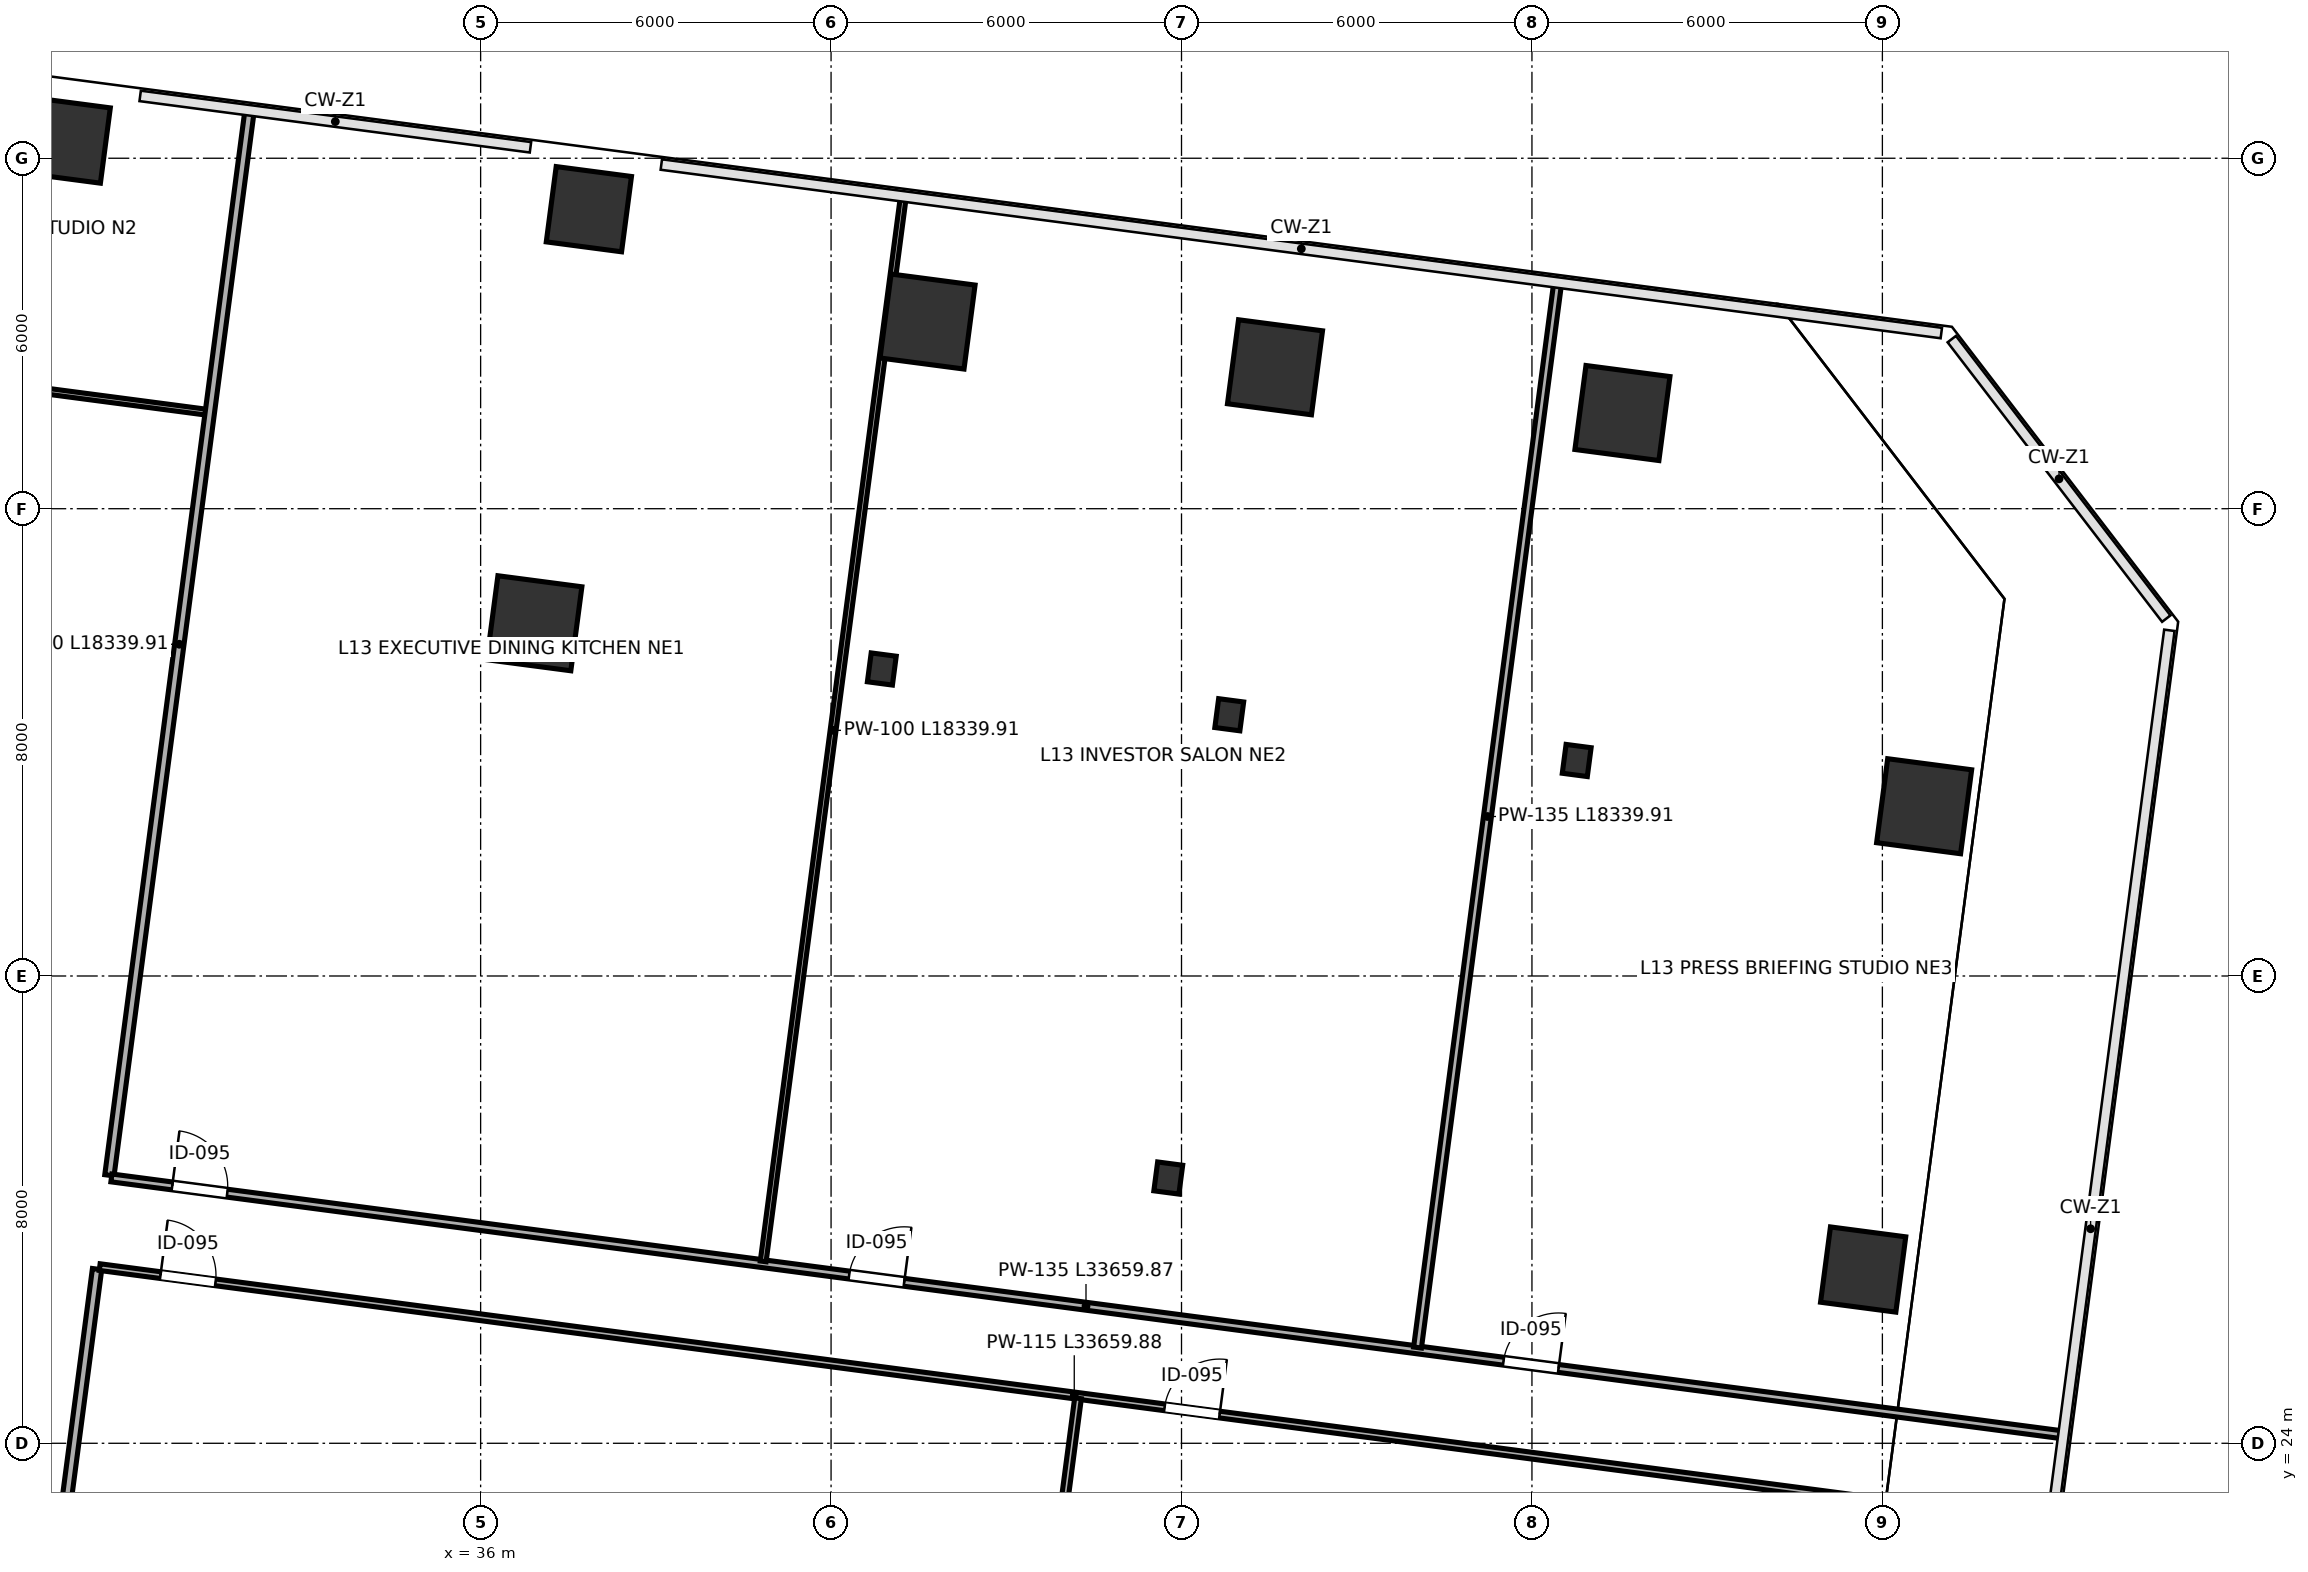
"""IFC4 building model, lengths in metres.
Left out: names, types, materials, properties, quantities, classifications, styles, units other than length and angle.
Written with IfcOpenShell. Run it as: python <this file> out.ifc"""

import sys

from ifc_helpers import new_model, si_unit, direction, frame, frame_2d, origin, origin_2d, place, context, subcontext, project, spatial, rectangle, i_section, extrude, source, transform, mapped, element, fill, save


model = new_model("IFC4")
c1 = context("Model", 3, precision=1e-05, world=origin(), true_north=direction((0.0, 1.0)))
c2 = subcontext(c1, "Body", "Model", "MODEL_VIEW")
j1 = project(units=[si_unit("LENGTHUNIT", "METRE"), si_unit("PLANEANGLEUNIT", "RADIAN")], contexts=[c1])
p1 = place(None, origin())
s1 = spatial("IfcSite", under=j1, at=p1, CompositionType="ELEMENT")
p2 = place(p1, origin())
s2 = spatial("IfcBuilding", under=s1, at=p2, CompositionType="ELEMENT")
p3 = place(p2, frame((0.0, 0.0, 61.6)))
s3 = spatial("IfcBuildingStorey", under=s2, at=p3, CompositionType="ELEMENT", Elevation=61.6)
m1 = source(origin(), c2, "Body", "SweptSolid", [
    extrude(rectangle(XDim=1.3, YDim=1.3, at=origin_2d()), origin(), (0.0, 0.0, 1.0), 4.798),
])
p4 = place(p3, frame((28.93, 46.302, 0.001), z_axis=(0.0, 0.0, 1.0), x_axis=(-0.991444861374, 0.13052619222, 0.0)))
e1 = element("IfcColumn", 1, at=p4, inside=s3, PredefinedType="COLUMN", context=c2, shape_type="MappedRepresentation", body=[
    mapped(m1, transform((0.0, 0.0, 0.0), scale=1.0)),
])
m2 = source(origin(), c2, "Body", "SweptSolid", [
    extrude(rectangle(XDim=1.45, YDim=1.45, at=origin_2d()), origin(), (0.0, 0.0, 1.0), 4.798),
])
p5 = place(p3, frame((36.92, 38.039, 0.001), z_axis=(0.0, 0.0, 1.0), x_axis=(-0.991444861374, 0.13052619222, 0.0)))
e2 = element("IfcColumn", 2, at=p5, inside=s3, PredefinedType="COLUMN", context=c2, shape_type="MappedRepresentation", body=[
    mapped(m2, transform((0.0, 0.0, 0.0), scale=1.0)),
])
p6 = place(p3, frame((37.854, 45.128, 0.001), z_axis=(0.0, 0.0, 1.0), x_axis=(-0.991444861374, 0.13052619222, 0.0)))
e3 = element("IfcColumn", 3, at=p6, inside=s3, PredefinedType="COLUMN", context=c2, shape_type="MappedRepresentation", body=[
    mapped(m1, transform((0.0, 0.0, 0.0), scale=1.0)),
])
m3 = source(origin(), c2, "Body", "SweptSolid", [
    extrude(i_section(OverallWidth=0.432, OverallDepth=0.498, WebThickness=0.056, FlangeThickness=0.089, FilletRadius=0.015, at=origin_2d()), origin(), (0.0, 0.0, 1.0), 4.798),
])
p7 = place(p3, frame((42.869, 37.256, 0.001), z_axis=(0.0, 0.0, 1.0), x_axis=(-0.991444861374, 0.13052619222, 0.0)))
e4 = element("IfcColumn", 4, at=p7, inside=s3, PredefinedType="COLUMN", context=c2, shape_type="MappedRepresentation", body=[
    mapped(m3, transform((0.0, 0.0, 0.0), scale=1.0)),
])
p8 = place(p3, frame((43.652, 43.204, 0.001), z_axis=(0.0, 0.0, 1.0), x_axis=(-0.991444861374, 0.13052619222, 0.0)))
e5 = element("IfcColumn", 5, at=p8, inside=s3, PredefinedType="COLUMN", context=c2, shape_type="MappedRepresentation", body=[
    mapped(m2, transform((0.0, 0.0, 0.0), scale=1.0)),
])
for number, where, z_axis, x_axis in (
    (6, (47.773, 28.541, 0.001), (0.0, 0.0, 1.0), (-0.991, 0.131, 0.0)),
    (7, (48.817, 36.473, 0.001), (0.0, 0.0, 1.0), (-0.991, 0.131, 0.0)),
):
    element("IfcColumn", number, at=place(p3, frame(where, z_axis=z_axis, x_axis=x_axis)), inside=s3, PredefinedType="COLUMN", context=c2, shape_type="MappedRepresentation", body=[
        mapped(m3, transform((0.0, 0.0, 0.0), scale=1.0)),
    ])
p9 = place(p3, frame((49.601, 42.421, 0.001), z_axis=(0.0, 0.0, 1.0), x_axis=(-0.991444861374, 0.13052619222, 0.0)))
e8 = element("IfcColumn", 8, at=p9, inside=s3, PredefinedType="COLUMN", context=c2, shape_type="MappedRepresentation", body=[
    mapped(m2, transform((0.0, 0.0, 0.0), scale=1.0)),
])
p10 = place(p3, frame((54.766, 35.689, 0.001), z_axis=(0.0, 0.0, 1.0), x_axis=(-0.991444861374, 0.13052619222, 0.0)))
e9 = element("IfcColumn", 9, at=p10, inside=s3, PredefinedType="COLUMN", context=c2, shape_type="MappedRepresentation", body=[
    mapped(m3, transform((0.0, 0.0, 0.0), scale=1.0)),
])
p11 = place(p3, frame((55.549, 41.638, 0.001), z_axis=(0.0, 0.0, 1.0), x_axis=(-0.991444861374, 0.13052619222, 0.0)))
e10 = element("IfcColumn", 10, at=p11, inside=s3, PredefinedType="COLUMN", context=c2, shape_type="MappedRepresentation", body=[
    mapped(m2, transform((0.0, 0.0, 0.0), scale=1.0)),
])
p12 = place(p3, frame((59.671, 26.975, 0.001), z_axis=(0.0, 0.0, 1.0), x_axis=(-0.991444861374, 0.13052619222, 0.0)))
e11 = element("IfcColumn", 11, at=p12, inside=s3, PredefinedType="COLUMN", context=c2, shape_type="MappedRepresentation", body=[
    mapped(m1, transform((0.0, 0.0, 0.0), scale=1.0)),
])
m4 = source(origin(), c2, "Body", "SweptSolid", [
    extrude(rectangle(XDim=1.45, YDim=1.45, at=origin_2d()), origin(), (0.0, 0.0, 1.0), 4.798),
])
p13 = place(p3, frame((60.715, 34.906, 0.001), z_axis=(0.0, 0.0, 1.0), x_axis=(-0.991444861374, 0.13052619222, 0.0)))
e12 = element("IfcColumn", 12, at=p13, inside=s3, PredefinedType="COLUMN", context=c2, shape_type="MappedRepresentation", body=[
    mapped(m4, transform((0.0, 0.0, 0.0), scale=1.0)),
])
p14 = place(p3, frame((5.546, 45.044, 0.0), z_axis=(0.0, 0.0, 1.0), x_axis=(0.99144534416, -0.13052252504, 0.0)))
e13 = element("IfcWall", 13, at=p14, inside=s3, PredefinedType="PARTITIONING", context=c2, shape_type="SweptSolid", body=[
    extrude(rectangle(XDim=26.0, YDim=0.1, at=frame_2d((13.0, 0.0))), origin(), (0.0, 0.0, 1.0), 4.56),
])
p15 = place(p14, frame((0.91, 0.0, 0.0)))
e14 = element("IfcOpeningElement", 14, at=p15, cuts=e13, PredefinedType="OPENING", context=c2, shape_type="SweptSolid", body=[
    extrude(rectangle(XDim=0.95, YDim=2.15, at=frame_2d((0.475, 1.075))), frame((0.0, 0.06, 0.0), z_axis=(0.0, -1.0, 0.0), x_axis=(1.0, 0.0, 0.0)), (0.0, 0.0, 1.0), 0.12),
])
p16 = place(p14, frame((19.11, 0.0, 0.0)))
e15 = element("IfcOpeningElement", 15, at=p16, cuts=e13, PredefinedType="OPENING", context=c2, shape_type="SweptSolid", body=[
    extrude(rectangle(XDim=0.95, YDim=2.15, at=frame_2d((0.475, 1.075))), frame((0.0, 0.06, 0.0), z_axis=(0.0, -1.0, 0.0), x_axis=(1.0, 0.0, 0.0)), (0.0, 0.0, 1.0), 0.12),
])
p17 = place(p3, frame((29.644, 28.588, 0.0), z_axis=(0.0, 0.0, 1.0), x_axis=(0.130525105318, 0.991445004467, 0.0)))
e16 = element("IfcWall", 16, at=p17, inside=s3, PredefinedType="PARTITIONING", context=c2, shape_type="SweptSolid", body=[
    extrude(rectangle(XDim=18.34, YDim=0.16, at=frame_2d((9.17, 0.0))), origin(), (0.0, 0.0, 1.0), 3.695),
])
p18 = place(p3, frame((27.595, 13.022, 0.0), z_axis=(0.0, 0.0, 1.0), x_axis=(0.130532558102, 0.991444023269, 0.0)))
e17 = element("IfcWall", 17, at=p18, inside=s3, PredefinedType="PARTITIONING", context=c2, shape_type="SweptSolid", body=[
    extrude(rectangle(XDim=14.08, YDim=0.16, at=frame_2d((7.04, 0.0))), origin(), (0.0, 0.0, 1.0), 4.56),
])
p19 = place(p3, frame((29.679, 28.543, 0.0), z_axis=(0.0, 0.0, 1.0), x_axis=(0.991444714197, -0.130527310133, 0.0)))
e18 = element("IfcWall", 18, at=p19, inside=s3, PredefinedType="PARTITIONING", context=c2, shape_type="SweptSolid", body=[
    extrude(rectangle(XDim=33.66, YDim=0.135, at=frame_2d((16.83, 0.0))), origin(), (0.0, 0.0, 1.0), 3.695),
])
p20 = place(p19, frame((1.05, 0.0, 0.0)))
e19 = element("IfcOpeningElement", 19, at=p20, cuts=e18, PredefinedType="OPENING", context=c2, shape_type="SweptSolid", body=[
    extrude(rectangle(XDim=0.95, YDim=2.15, at=frame_2d((0.475, 1.075))), frame((0.0, 0.078, 0.0), z_axis=(0.0, -1.0, 0.0), x_axis=(1.0, 0.0, 0.0)), (0.0, 0.0, 1.0), 0.155),
])
p21 = place(p19, frame((12.74, 0.0, 0.0)))
e20 = element("IfcOpeningElement", 20, at=p21, cuts=e18, PredefinedType="OPENING", context=c2, shape_type="SweptSolid", body=[
    extrude(rectangle(XDim=0.95, YDim=2.15, at=frame_2d((0.475, 1.075))), frame((0.0, 0.078, 0.0), z_axis=(0.0, -1.0, 0.0), x_axis=(1.0, 0.0, 0.0)), (0.0, 0.0, 1.0), 0.155),
])
p22 = place(p19, frame((24.04, 0.0, 0.0)))
e21 = element("IfcOpeningElement", 21, at=p22, cuts=e18, PredefinedType="OPENING", context=c2, shape_type="SweptSolid", body=[
    extrude(rectangle(XDim=0.95, YDim=2.15, at=frame_2d((0.475, 1.075))), frame((0.0, 0.078, 0.0), z_axis=(0.0, -1.0, 0.0), x_axis=(1.0, 0.0, 0.0)), (0.0, 0.0, 1.0), 0.155),
])
p23 = place(p3, frame((29.478, 27.016, 0.0), z_axis=(0.0, 0.0, 1.0), x_axis=(0.991444590622, -0.130528248771, 0.0)))
e22 = element("IfcWall", 22, at=p23, inside=s3, PredefinedType="PARTITIONING", context=c2, shape_type="SweptSolid", body=[
    extrude(rectangle(XDim=33.66, YDim=0.115, at=frame_2d((16.83, 0.0))), origin(), (0.0, 0.0, 1.0), 3.695),
])
p24 = place(p23, frame((1.05, 0.0, 0.0)))
e23 = element("IfcOpeningElement", 23, at=p24, cuts=e22, PredefinedType="OPENING", context=c2, shape_type="SweptSolid", body=[
    extrude(rectangle(XDim=0.95, YDim=2.15, at=frame_2d((0.475, 1.075))), frame((0.0, 0.067, 0.0), z_axis=(0.0, -1.0, 0.0), x_axis=(1.0, 0.0, 0.0)), (0.0, 0.0, 1.0), 0.135),
])
p25 = place(p23, frame((18.39, 0.0, 0.0)))
e24 = element("IfcOpeningElement", 24, at=p25, cuts=e22, PredefinedType="OPENING", context=c2, shape_type="SweptSolid", body=[
    extrude(rectangle(XDim=0.95, YDim=2.15, at=frame_2d((0.475, 1.075))), frame((0.0, 0.067, 0.0), z_axis=(0.0, -1.0, 0.0), x_axis=(1.0, 0.0, 0.0)), (0.0, 0.0, 1.0), 0.135),
])
p26 = place(p3, frame((40.838, 27.114, 0.0), z_axis=(0.0, 0.0, 1.0), x_axis=(0.130538190585, 0.991443281685, 0.0)))
e25 = element("IfcWall", 25, at=p26, inside=s3, PredefinedType="PARTITIONING", context=c2, shape_type="SweptSolid", body=[
    extrude(rectangle(XDim=18.34, YDim=0.1, at=frame_2d((9.17, 0.0))), origin(), (0.0, 0.0, 1.0), 4.56),
])
p27 = place(p3, frame((52.041, 25.639, 0.0), z_axis=(0.0, 0.0, 1.0), x_axis=(0.130523382643, 0.991445231258, 0.0)))
e26 = element("IfcWall", 26, at=p27, inside=s3, PredefinedType="PARTITIONING", context=c2, shape_type="SweptSolid", body=[
    extrude(rectangle(XDim=18.34, YDim=0.135, at=frame_2d((9.17, 0.0))), origin(), (0.0, 0.0, 1.0), 3.923),
])
p28 = place(p3, frame((44.964, 15.173, 0.0), z_axis=(0.0, 0.0, 1.0), x_axis=(0.130519754353, 0.991445708914, 0.0)))
e27 = element("IfcWall", 27, at=p28, inside=s3, PredefinedType="PARTITIONING", context=c2, shape_type="SweptSolid", body=[
    extrude(rectangle(XDim=9.68, YDim=0.115, at=frame_2d((4.84, 0.0))), origin(), (0.0, 0.0, 1.0), 4.56),
])
m5 = source(origin(), c2, "Body", "SweptSolid", [
    extrude(rectangle(XDim=0.95, YDim=2.15, at=frame_2d((0.475, 1.075))), frame((0.0, 0.025, 0.0), z_axis=(0.0, -1.0, 0.0), x_axis=(1.0, 0.0, 0.0)), (0.0, 0.0, 1.0), 0.05),
])
p29 = place(p20, origin())
e28 = element("IfcDoor", 28, at=p29, inside=s3, OperationType="SINGLE_SWING_LEFT", PredefinedType="DOOR", context=c2, shape_type="MappedRepresentation", body=[
    mapped(m5, transform((0.0, 0.0, 0.0), scale=1.0)),
])
fill(e19, e28)
p30 = place(p21, origin())
e29 = element("IfcDoor", 29, at=p30, inside=s3, OperationType="SINGLE_SWING_RIGHT", PredefinedType="DOOR", context=c2, shape_type="MappedRepresentation", body=[
    mapped(m5, transform((0.0, 0.0, 0.0), scale=1.0)),
])
fill(e20, e29)
p31 = place(p22, origin())
e30 = element("IfcDoor", 30, at=p31, inside=s3, OperationType="SINGLE_SWING_RIGHT", PredefinedType="DOOR", context=c2, shape_type="MappedRepresentation", body=[
    mapped(m5, transform((0.0, 0.0, 0.0), scale=1.0)),
])
fill(e21, e30)
p32 = place(p24, origin())
e31 = element("IfcDoor", 31, at=p32, inside=s3, OperationType="SINGLE_SWING_LEFT", PredefinedType="DOOR", context=c2, shape_type="MappedRepresentation", body=[
    mapped(m5, transform((0.0, 0.0, 0.0), scale=1.0)),
])
fill(e23, e31)
p33 = place(p25, origin())
e32 = element("IfcDoor", 32, at=p33, inside=s3, OperationType="SINGLE_SWING_RIGHT", PredefinedType="DOOR", context=c2, shape_type="MappedRepresentation", body=[
    mapped(m5, transform((0.0, 0.0, 0.0), scale=1.0)),
])
fill(e24, e32)
save(model, sys.argv[1])
